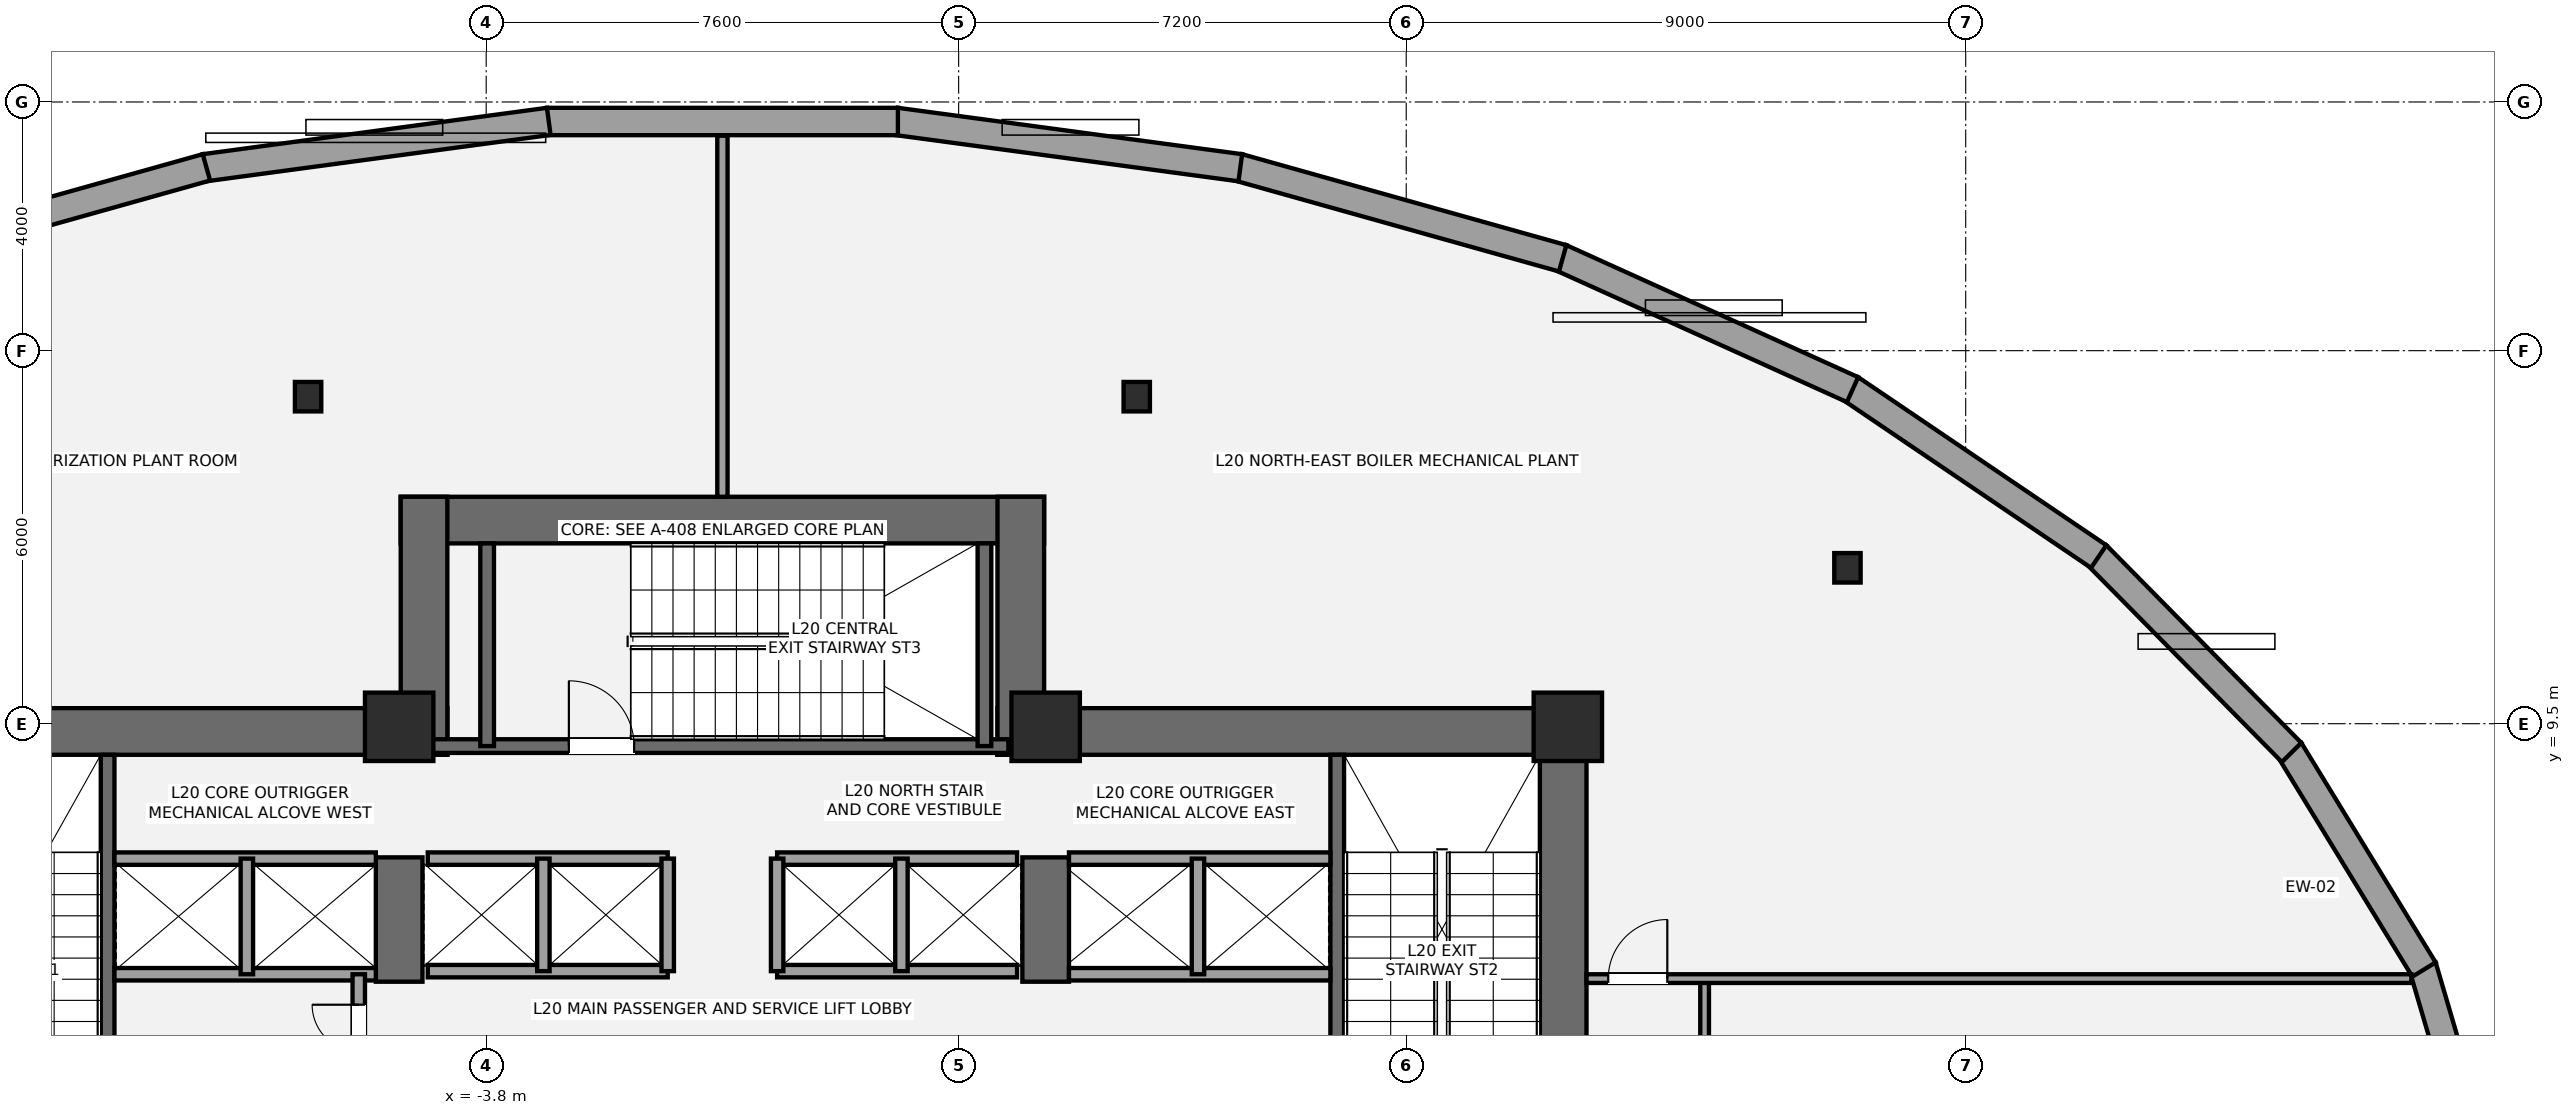
"""IFC4 building model, lengths in metres.
Left out: names, types, materials, properties, quantities, classifications, styles, units other than length and angle.
Written with IfcOpenShell. Run it as: python <this file> out.ifc"""

import sys

from ifc_helpers import new_model, si_unit, direction, frame, frame_2d, origin, origin_2d, place, context, subcontext, project, spatial, rectangle, i_section, extrude, element, fill, save


model = new_model("IFC4")
c1 = context("Model", 3, precision=1e-05, world=origin(), true_north=direction((0.0, 1.0)))
c2 = subcontext(c1, "Body", "Model", "MODEL_VIEW")
j1 = project(units=[si_unit("LENGTHUNIT", "METRE"), si_unit("PLANEANGLEUNIT", "RADIAN")], contexts=[c1])
p1 = place(None, origin())
s1 = spatial("IfcSite", under=j1, at=p1, CompositionType="ELEMENT")
p2 = place(p1, origin())
s2 = spatial("IfcBuilding", under=s1, at=p2, CompositionType="ELEMENT")
p3 = place(p2, frame((0.0, 0.0, 77.4)))
s3 = spatial("IfcBuildingStorey", under=s2, at=p3, CompositionType="ELEMENT", Elevation=77.4)
p4 = place(p3, frame((-13.9, 9.375, 0.0), z_axis=(0.0, 0.0, 1.0), x_axis=(1.0, 0.0, 0.0)))
e1 = element("IfcWall", 1, at=p4, inside=s3, PredefinedType="SHEAR", context=c2, shape_type="SweptSolid", body=[
    extrude(rectangle(XDim=9.475, YDim=0.75, at=frame_2d((4.737, 0.0))), origin(), (0.0, 0.0, 1.0), 4.5),
])
p5 = place(p3, frame((-5.2, 5.35, 0.0), z_axis=(0.0, 0.0, 1.0), x_axis=(0.0, 1.0, 0.0)))
e2 = element("IfcWall", 2, at=p5, inside=s3, PredefinedType="SHEAR", context=c2, shape_type="SweptSolid", body=[
    extrude(rectangle(XDim=2.0, YDim=0.75, at=frame_2d((1.0, 0.0))), origin(), (0.0, 0.0, 1.0), 4.5),
])
p6 = place(p3, frame((-9.89, 1.85, 0.0), z_axis=(0.0, 0.0, 1.0), x_axis=(0.0, 1.0, 0.0)))
e3 = element("IfcWall", 3, at=p6, inside=s3, PredefinedType="SHEAR", context=c2, shape_type="SweptSolid", body=[
    extrude(rectangle(XDim=7.15, YDim=0.22, at=frame_2d((3.575, 0.0))), origin(), (0.0, 0.0, 1.0), 4.5),
])
p7 = place(p3, frame((13.525, 1.1, 0.0), z_axis=(0.0, 0.0, 1.0), x_axis=(0.0, 1.0, 0.0)))
e4 = element("IfcWall", 4, at=p7, inside=s3, PredefinedType="SHEAR", context=c2, shape_type="SweptSolid", body=[
    extrude(rectangle(XDim=8.65, YDim=0.75, at=frame_2d((4.325, 0.0))), origin(), (0.0, 0.0, 1.0), 4.5),
])
p8 = place(p3, frame((4.425, 9.375, 0.0), z_axis=(0.0, 0.0, 1.0), x_axis=(1.0, 0.0, 0.0)))
e5 = element("IfcWall", 5, at=p8, inside=s3, PredefinedType="SHEAR", context=c2, shape_type="SweptSolid", body=[
    extrude(rectangle(XDim=9.475, YDim=0.75, at=frame_2d((4.737, 0.0))), origin(), (0.0, 0.0, 1.0), 4.5),
])
p9 = place(p3, frame((5.2, 5.35, 0.0), z_axis=(0.0, 0.0, 1.0), x_axis=(0.0, 1.0, 0.0)))
e6 = element("IfcWall", 6, at=p9, inside=s3, PredefinedType="SHEAR", context=c2, shape_type="SweptSolid", body=[
    extrude(rectangle(XDim=2.0, YDim=0.75, at=frame_2d((1.0, 0.0))), origin(), (0.0, 0.0, 1.0), 4.5),
])
p10 = place(p3, frame((9.89, 1.85, 0.0), z_axis=(0.0, 0.0, 1.0), x_axis=(0.0, 1.0, 0.0)))
e7 = element("IfcWall", 7, at=p10, inside=s3, PredefinedType="SHEAR", context=c2, shape_type="SweptSolid", body=[
    extrude(rectangle(XDim=7.15, YDim=0.22, at=frame_2d((3.575, 0.0))), origin(), (0.0, 0.0, 1.0), 4.5),
])
p11 = place(p3, frame((-5.175, 12.775, 0.0), z_axis=(0.0, 0.0, 1.0), x_axis=(1.0, 0.0, 0.0)))
e8 = element("IfcWall", 8, at=p11, inside=s3, PredefinedType="SHEAR", context=c2, shape_type="SweptSolid", body=[
    extrude(rectangle(XDim=10.35, YDim=0.75, at=frame_2d((5.175, 0.0))), origin(), (0.0, 0.0, 1.0), 4.5),
])
for number, where, z_axis, x_axis in (
    (9, (-4.8, 9.0, 0.0), (0.0, 0.0, 1.0), (0.0, 1.0, 0.0)),
    (10, (4.8, 9.0, 0.0), (0.0, 0.0, 1.0), (0.0, 1.0, 0.0)),
):
    element("IfcWall", number, at=place(p3, frame(where, z_axis=z_axis, x_axis=x_axis)), inside=s3, PredefinedType="SHEAR", context=c2, shape_type="SweptSolid", body=[
        extrude(rectangle(XDim=4.15, YDim=0.75, at=frame_2d((2.075, 0.0))), origin(), (0.0, 0.0, 1.0), 4.5),
    ])
p12 = place(p3, frame((-4.7, 9.14, 0.0), z_axis=(0.0, 0.0, 1.0), x_axis=(1.0, 0.0, 0.0)))
e11 = element("IfcWall", 11, at=p12, inside=s3, PredefinedType="SHEAR", context=c2, shape_type="SweptSolid", body=[
    extrude(rectangle(XDim=9.3, YDim=0.22, at=frame_2d((4.65, 0.0))), origin(), (0.0, 0.0, 1.0), 4.5),
])
p13 = place(p12, frame((2.23, 0.0, 0.0)))
e12 = element("IfcOpeningElement", 12, at=p13, cuts=e11, PredefinedType="OPENING", context=c2, shape_type="SweptSolid", body=[
    extrude(rectangle(XDim=1.05, YDim=2.15, at=frame_2d((0.525, 1.075))), frame((0.0, 0.12, 0.0), z_axis=(0.0, -1.0, 0.0), x_axis=(1.0, 0.0, 0.0)), (0.0, 0.0, 1.0), 0.24),
])
for number, where, z_axis, x_axis in (
    (13, (-3.785, 9.14, 0.0), (0.0, 0.0, 1.0), (0.0, 1.0, 0.0)),
    (14, (4.215, 9.14, 0.0), (0.0, 0.0, 1.0), (0.0, 1.0, 0.0)),
):
    element("IfcWall", number, at=place(p3, frame(where, z_axis=z_axis, x_axis=x_axis)), inside=s3, PredefinedType="SHEAR", context=c2, shape_type="SweptSolid", body=[
        extrude(rectangle(XDim=3.26, YDim=0.22, at=frame_2d((1.63, 0.0))), origin(), (0.0, 0.0, 1.0), 4.5),
    ])
for number, where, z_axis, x_axis in (
    (15, (-5.2, 9.45, 0.0), (0.0, 0.0, 1.0), (1.0, 0.0, 0.0)),
    (16, (5.2, 9.45, 0.0), (0.0, 0.0, 1.0), (1.0, 0.0, 0.0)),
    (17, (13.6, 9.45, 0.0), (0.0, 0.0, 1.0), (1.0, 0.0, 0.0)),
):
    element("IfcColumn", number, at=place(p3, frame(where, z_axis=z_axis, x_axis=x_axis)), inside=s3, PredefinedType="COLUMN", context=c2, shape_type="SweptSolid", body=[
        extrude(rectangle(XDim=1.1, YDim=1.1, at=origin_2d()), origin(), (0.0, 0.0, 1.0), 4.5),
    ])
for number, where, z_axis, x_axis in (
    (18, (18.098, 12.007, 0.0), (0.0, 0.0, 1.0), (1.0, 0.0, 0.0)),
    (19, (6.665, 14.76, 0.0), (0.0, 0.0, 1.0), (1.0, 0.0, 0.0)),
    (20, (-6.665, 14.76, 0.0), (0.0, 0.0, 1.0), (1.0, 0.0, 0.0)),
):
    element("IfcColumn", number, at=place(p3, frame(where, z_axis=z_axis, x_axis=x_axis)), inside=s3, PredefinedType="COLUMN", context=c2, shape_type="SweptSolid", body=[
        extrude(i_section(OverallWidth=0.424, OverallDepth=0.474, WebThickness=0.048, FlangeThickness=0.077, at=origin_2d()), origin(), (0.0, 0.0, 1.0), 4.5),
    ])
p14 = place(p3, frame((27.349, 5.599, 0.0), z_axis=(0.0, 0.0, 1.0), x_axis=(0.281834819638, -0.959462940629, 0.0)))
e21 = element("IfcWall", 21, at=p14, inside=s3, PredefinedType="STANDARD", context=c2, shape_type="SweptSolid", body=[
    extrude(rectangle(XDim=3.908, YDim=0.44, at=frame_2d((1.954, 0.0))), origin(), (0.0, 0.0, 1.0), 3.498),
])
p15 = place(p3, frame((25.212, 9.077, 0.0), z_axis=(0.0, 0.0, 1.0), x_axis=(0.521891226532, -0.85301204427, 0.0)))
e22 = element("IfcWall", 22, at=p15, inside=s3, PredefinedType="STANDARD", context=c2, shape_type="SweptSolid", body=[
    extrude(rectangle(XDim=4.14, YDim=0.44, at=frame_2d((2.07, 0.0))), origin(), (0.0, 0.0, 1.0), 3.498),
])
p16 = place(p3, frame((22.106, 12.216, 0.0), z_axis=(0.0, 0.0, 1.0), x_axis=(0.702361901729, -0.711820032733, 0.0)))
e23 = element("IfcWall", 23, at=p16, inside=s3, PredefinedType="STANDARD", context=c2, shape_type="SweptSolid", body=[
    extrude(rectangle(XDim=4.466, YDim=0.44, at=frame_2d((2.233, 0.0))), origin(), (0.0, 0.0, 1.0), 3.498),
])
p17 = place(p3, frame((18.147, 14.892, 0.0), z_axis=(0.0, 0.0, 1.0), x_axis=(0.82804003003, -0.560668983151, 0.0)))
e24 = element("IfcWall", 24, at=p17, inside=s3, PredefinedType="STANDARD", context=c2, shape_type="SweptSolid", body=[
    extrude(rectangle(XDim=4.821, YDim=0.44, at=frame_2d((2.411, 0.0))), origin(), (0.0, 0.0, 1.0), 3.498),
])
p18 = place(p3, frame((13.486, 16.997, 0.0), z_axis=(0.0, 0.0, 1.0), x_axis=(0.911088856004, -0.412210014999, 0.0)))
e25 = element("IfcWall", 25, at=p18, inside=s3, PredefinedType="STANDARD", context=c2, shape_type="SweptSolid", body=[
    extrude(rectangle(XDim=5.152, YDim=0.44, at=frame_2d((2.576, 0.0))), origin(), (0.0, 0.0, 1.0), 3.498),
])
p19 = place(p3, frame((8.301, 18.448, 0.0), z_axis=(0.0, 0.0, 1.0), x_axis=(0.962849260033, -0.270039446109, 0.0)))
e26 = element("IfcWall", 26, at=p19, inside=s3, PredefinedType="STANDARD", context=c2, shape_type="SweptSolid", body=[
    extrude(rectangle(XDim=5.417, YDim=0.44, at=frame_2d((2.708, 0.0))), origin(), (0.0, 0.0, 1.0), 3.498),
])
p20 = place(p3, frame((2.793, 19.188, 0.0), z_axis=(0.0, 0.0, 1.0), x_axis=(0.9910561058, -0.133445851026, 0.0)))
e27 = element("IfcWall", 27, at=p20, inside=s3, PredefinedType="STANDARD", context=c2, shape_type="SweptSolid", body=[
    extrude(rectangle(XDim=5.587, YDim=0.44, at=frame_2d((2.794, 0.0))), origin(), (0.0, 0.0, 1.0), 3.498),
])
p21 = place(p3, frame((-2.823, 19.186, 0.0), z_axis=(0.0, 0.0, 1.0), x_axis=(1.0, 0.0, 0.0)))
e28 = element("IfcWall", 28, at=p21, inside=s3, PredefinedType="STANDARD", context=c2, shape_type="SweptSolid", body=[
    extrude(rectangle(XDim=5.646, YDim=0.44, at=frame_2d((2.823, 0.0))), origin(), (0.0, 0.0, 1.0), 3.498),
])
p22 = place(p3, frame((-8.331, 18.442, 0.0), z_axis=(0.0, 0.0, 1.0), x_axis=(0.9910561058, 0.133445851026, 0.0)))
e29 = element("IfcWall", 29, at=p22, inside=s3, PredefinedType="STANDARD", context=c2, shape_type="SweptSolid", body=[
    extrude(rectangle(XDim=5.587, YDim=0.44, at=frame_2d((2.794, 0.0))), origin(), (0.0, 0.0, 1.0), 3.498),
])
p23 = place(p3, frame((-13.517, 16.986, 0.0), z_axis=(0.0, 0.0, 1.0), x_axis=(0.962849260033, 0.270039446109, 0.0)))
e30 = element("IfcWall", 30, at=p23, inside=s3, PredefinedType="STANDARD", context=c2, shape_type="SweptSolid", body=[
    extrude(rectangle(XDim=5.417, YDim=0.44, at=frame_2d((2.708, 0.0))), origin(), (0.0, 0.0, 1.0), 3.498),
])
for number, where, z_axis, x_axis in (
    (31, (-9.78, 5.47, 0.0), (0.0, 0.0, 1.0), (1.0, 0.0, 0.0)),
    (32, (-9.78, 7.33, 0.0), (0.0, 0.0, 1.0), (1.0, 0.0, 0.0)),
):
    element("IfcWall", number, at=place(p3, frame(where, z_axis=z_axis, x_axis=x_axis)), inside=s3, PredefinedType="SOLIDWALL", context=c2, shape_type="SweptSolid", body=[
        extrude(rectangle(XDim=4.205, YDim=0.2, at=frame_2d((2.103, 0.0))), origin(), (0.0, 0.0, 1.0), 4.28),
    ])
p24 = place(p3, frame((-7.65, 5.47, 0.0), z_axis=(0.0, 0.0, 1.0), x_axis=(0.0, 1.0, 0.0)))
e33 = element("IfcWall", 33, at=p24, inside=s3, PredefinedType="SOLIDWALL", context=c2, shape_type="SweptSolid", body=[
    extrude(rectangle(XDim=1.86, YDim=0.2, at=frame_2d((0.93, 0.0))), origin(), (0.0, 0.0, 1.0), 4.28),
])
p25 = place(p3, frame((-5.85, 3.78, 0.0), z_axis=(0.0, 0.0, 1.0), x_axis=(0.0, 1.0, 0.0)))
e34 = element("IfcWall", 34, at=p25, inside=s3, PredefinedType="SOLIDWALL", context=c2, shape_type="SweptSolid", body=[
    extrude(rectangle(XDim=1.69, YDim=0.2, at=frame_2d((0.845, 0.0))), origin(), (0.0, 0.0, 1.0), 4.28),
])
p26 = place(p25, frame((0.45, 0.0, 0.0)))
e35 = element("IfcOpeningElement", 35, at=p26, cuts=e34, PredefinedType="OPENING", context=c2, shape_type="SweptSolid", body=[
    extrude(rectangle(XDim=0.75, YDim=2.1, at=frame_2d((0.375, 1.05))), frame((0.0, 0.11, 0.0), z_axis=(0.0, -1.0, 0.0), x_axis=(1.0, 0.0, 0.0)), (0.0, 0.0, 1.0), 0.22),
])
for number, where, z_axis, x_axis in (
    (36, (5.575, 5.47, 0.0), (0.0, 0.0, 1.0), (1.0, 0.0, 0.0)),
    (37, (5.575, 7.33, 0.0), (0.0, 0.0, 1.0), (1.0, 0.0, 0.0)),
):
    element("IfcWall", number, at=place(p3, frame(where, z_axis=z_axis, x_axis=x_axis)), inside=s3, PredefinedType="SOLIDWALL", context=c2, shape_type="SweptSolid", body=[
        extrude(rectangle(XDim=4.205, YDim=0.2, at=frame_2d((2.103, 0.0))), origin(), (0.0, 0.0, 1.0), 4.28),
    ])
p27 = place(p3, frame((7.65, 5.47, 0.0), z_axis=(0.0, 0.0, 1.0), x_axis=(0.0, 1.0, 0.0)))
e38 = element("IfcWall", 38, at=p27, inside=s3, PredefinedType="SOLIDWALL", context=c2, shape_type="SweptSolid", body=[
    extrude(rectangle(XDim=1.86, YDim=0.2, at=frame_2d((0.93, 0.0))), origin(), (0.0, 0.0, 1.0), 4.28),
])
for number, where, z_axis, x_axis in (
    (39, (-4.74, 5.52, 0.0), (0.0, 0.0, 1.0), (1.0, 0.0, 0.0)),
    (40, (0.88, 5.52, 0.0), (0.0, 0.0, 1.0), (1.0, 0.0, 0.0)),
    (41, (-4.74, 7.33, 0.0), (0.0, 0.0, 1.0), (1.0, 0.0, 0.0)),
    (42, (0.88, 7.33, 0.0), (0.0, 0.0, 1.0), (1.0, 0.0, 0.0)),
):
    element("IfcWall", number, at=place(p3, frame(where, z_axis=z_axis, x_axis=x_axis)), inside=s3, PredefinedType="SOLIDWALL", context=c2, shape_type="SweptSolid", body=[
        extrude(rectangle(XDim=3.86, YDim=0.2, at=frame_2d((1.93, 0.0))), origin(), (0.0, 0.0, 1.0), 4.28),
    ])
for number, where, z_axis, x_axis in (
    (43, (-2.88, 5.52, 0.0), (0.0, 0.0, 1.0), (0.0, 1.0, 0.0)),
    (44, (2.88, 5.52, 0.0), (0.0, 0.0, 1.0), (0.0, 1.0, 0.0)),
    (45, (-0.88, 5.52, 0.0), (0.0, 0.0, 1.0), (0.0, 1.0, 0.0)),
    (46, (0.88, 5.52, 0.0), (0.0, 0.0, 1.0), (0.0, 1.0, 0.0)),
):
    element("IfcWall", number, at=place(p3, frame(where, z_axis=z_axis, x_axis=x_axis)), inside=s3, PredefinedType="SOLIDWALL", context=c2, shape_type="SweptSolid", body=[
        extrude(rectangle(XDim=1.81, YDim=0.2, at=frame_2d((0.905, 0.0))), origin(), (0.0, 0.0, 1.0), 4.28),
    ])
p28 = place(p3, frame((15.8, -5.8, 0.0), z_axis=(0.0, 0.0, 1.0), x_axis=(0.0, 1.0, 0.0)))
e47 = element("IfcWall", 47, at=p28, inside=s3, PredefinedType="PARTITIONING", context=c2, shape_type="SweptSolid", body=[
    extrude(rectangle(XDim=11.2, YDim=0.14, at=frame_2d((5.6, 0.0))), origin(), (0.0, 0.0, 1.0), 2.47),
])
p29 = place(p28, frame((0.35, 0.0, 0.0)))
e48 = element("IfcOpeningElement", 48, at=p29, cuts=e47, PredefinedType="OPENING", context=c2, shape_type="SweptSolid", body=[
    extrude(rectangle(XDim=0.95, YDim=2.15, at=frame_2d((0.475, 1.075))), frame((0.0, 0.08, 0.0), z_axis=(0.0, -1.0, 0.0), x_axis=(1.0, 0.0, 0.0)), (0.0, 0.0, 1.0), 0.16),
])
p30 = place(p28, frame((1.9, 0.0, 0.0)))
e49 = element("IfcOpeningElement", 49, at=p30, cuts=e47, PredefinedType="OPENING", context=c2, shape_type="SweptSolid", body=[
    extrude(rectangle(XDim=0.95, YDim=2.15, at=frame_2d((0.475, 1.075))), frame((0.0, 0.08, 0.0), z_axis=(0.0, -1.0, 0.0), x_axis=(1.0, 0.0, 0.0)), (0.0, 0.0, 1.0), 0.16),
])
p31 = place(p3, frame((13.9, 5.4, 0.0), z_axis=(0.0, 0.0, 1.0), x_axis=(1.0, 0.0, 0.0)))
e50 = element("IfcWall", 50, at=p31, inside=s3, PredefinedType="PARTITIONING", context=c2, shape_type="SweptSolid", body=[
    extrude(rectangle(XDim=13.27, YDim=0.14, at=frame_2d((6.635, 0.0))), origin(), (0.0, 0.0, 1.0), 3.733),
])
p32 = place(p31, frame((0.35, 0.0, 0.0)))
e51 = element("IfcOpeningElement", 51, at=p32, cuts=e50, PredefinedType="OPENING", context=c2, shape_type="SweptSolid", body=[
    extrude(rectangle(XDim=0.95, YDim=2.15, at=frame_2d((0.475, 1.075))), frame((0.0, 0.08, 0.0), z_axis=(0.0, -1.0, 0.0), x_axis=(1.0, 0.0, 0.0)), (0.0, 0.0, 1.0), 0.16),
])
p33 = place(p3, frame((0.0, 13.15, 0.0), z_axis=(0.0, 0.0, 1.0), x_axis=(0.0, 1.0, 0.0)))
e52 = element("IfcWall", 52, at=p33, inside=s3, PredefinedType="PARTITIONING", context=c2, shape_type="SweptSolid", body=[
    extrude(rectangle(XDim=5.808, YDim=0.165, at=frame_2d((2.904, 0.0))), origin(), (0.0, 0.0, 1.0), 4.28),
])
p34 = place(p13, origin())
e53 = element("IfcDoor", 53, at=p34, inside=s3, OperationType="SINGLE_SWING_LEFT", PredefinedType="DOOR", context=c2, shape_type="SweptSolid", body=[
    extrude(rectangle(XDim=1.05, YDim=2.15, at=frame_2d((0.525, 1.075))), frame((0.0, 0.025, 0.0), z_axis=(0.0, -1.0, 0.0), x_axis=(1.0, 0.0, 0.0)), (0.0, 0.0, 1.0), 0.05),
])
fill(e12, e53)
p35 = place(p26, origin())
e54 = element("IfcDoor", 54, at=p35, inside=s3, OperationType="SINGLE_SWING_RIGHT", PredefinedType="DOOR", context=c2, shape_type="SweptSolid", body=[
    extrude(rectangle(XDim=0.75, YDim=2.1, at=frame_2d((0.375, 1.05))), frame((0.0, 0.025, 0.0), z_axis=(0.0, -1.0, 0.0), x_axis=(1.0, 0.0, 0.0)), (0.0, 0.0, 1.0), 0.05),
])
fill(e35, e54)
p36 = place(p32, origin())
e55 = element("IfcDoor", 55, at=p36, inside=s3, OperationType="SINGLE_SWING_RIGHT", PredefinedType="DOOR", context=c2, shape_type="SweptSolid", body=[
    extrude(rectangle(XDim=0.95, YDim=2.15, at=frame_2d((0.475, 1.075))), frame((0.0, 0.025, 0.0), z_axis=(0.0, -1.0, 0.0), x_axis=(1.0, 0.0, 0.0)), (0.0, 0.0, 1.0), 0.05),
])
fill(e51, e55)
save(model, sys.argv[1])
